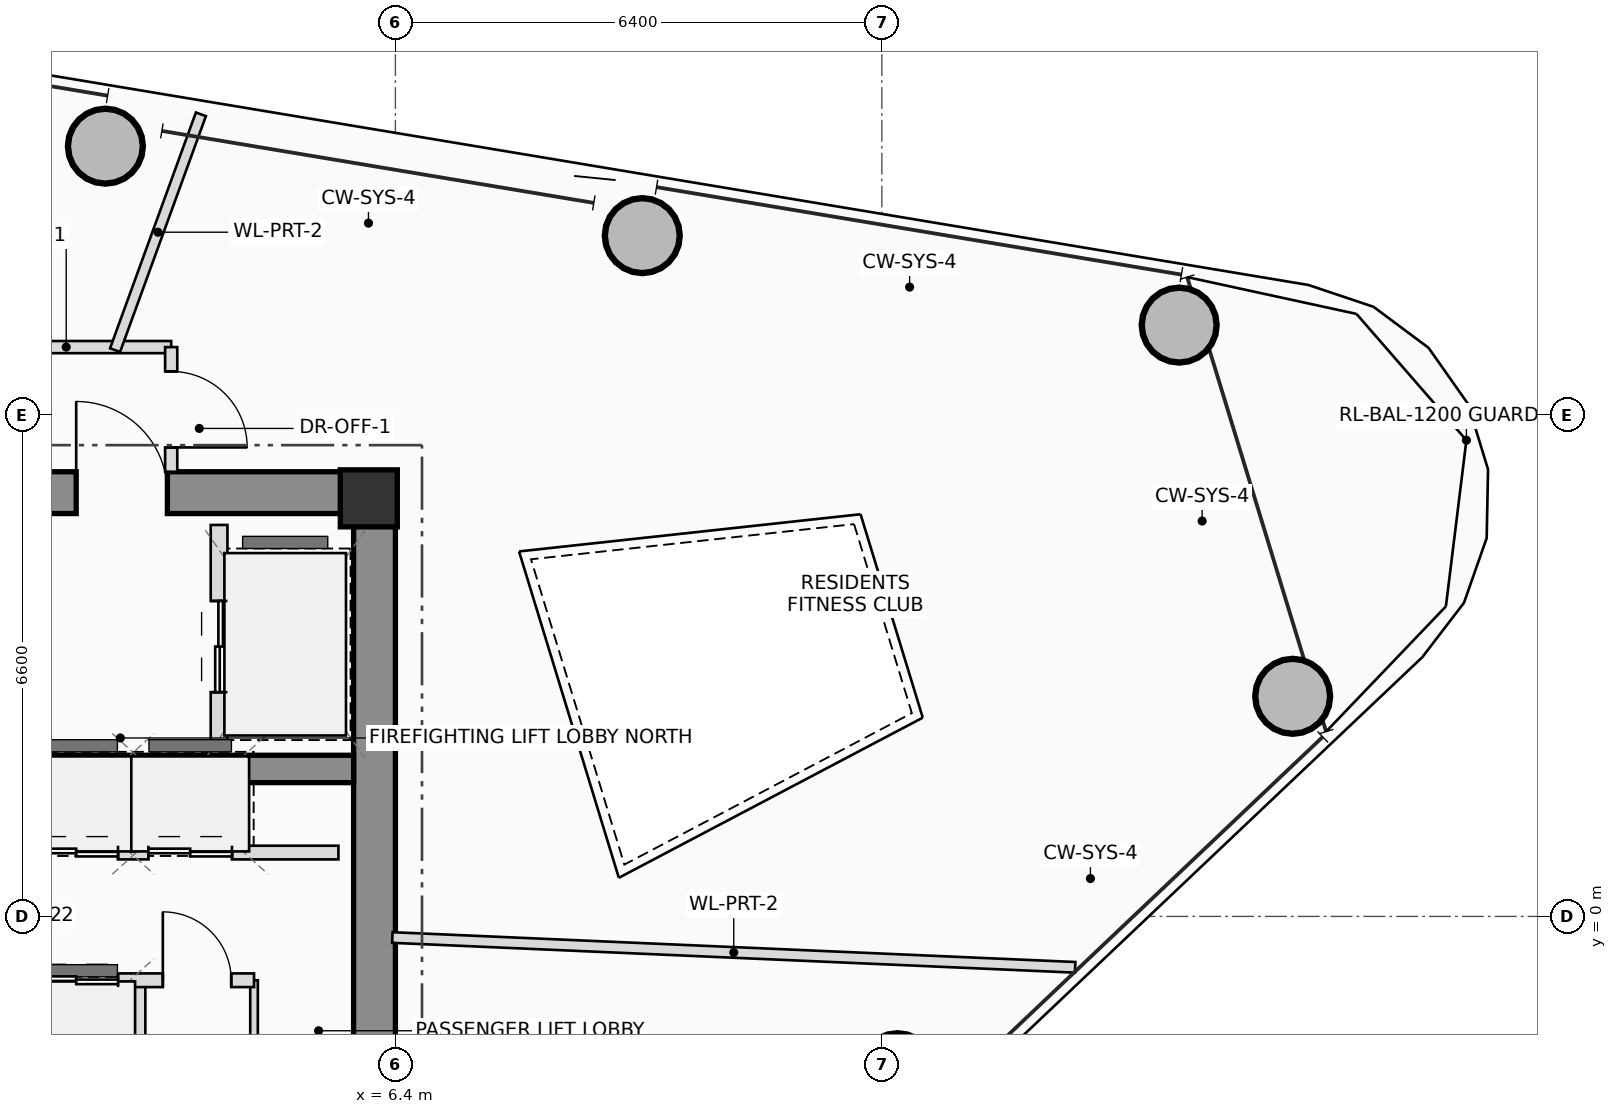
"""IFC4 building model, lengths in metres.
Left out: names, types, materials, properties, quantities, classifications, styles, units other than length and angle.
Written with IfcOpenShell. Run it as: python <this file> out.ifc"""

import sys

from ifc_helpers import new_model, si_unit, direction, frame, frame_2d, origin, origin_2d, place, context, subcontext, project, spatial, rectangle, hollow_circle, extrude, source, transform, mapped, element, fill, save


model = new_model("IFC4")
c1 = context("Model", 3, precision=1e-05, world=origin(), true_north=direction((0.0, 1.0)))
c2 = subcontext(c1, "Body", "Model", "MODEL_VIEW")
j1 = project(units=[si_unit("LENGTHUNIT", "METRE"), si_unit("PLANEANGLEUNIT", "RADIAN")], contexts=[c1])
p1 = place(None, origin())
s1 = spatial("IfcSite", under=j1, at=p1, CompositionType="ELEMENT")
p2 = place(p1, origin())
s2 = spatial("IfcBuilding", under=s1, at=p2, CompositionType="ELEMENT")
p3 = place(p2, frame((0.0, 0.0, 228.65)))
s3 = spatial("IfcBuildingStorey", under=s2, at=p3, CompositionType="ELEMENT", Elevation=228.65)
m1 = source(origin(), c2, "Body", "SweptSolid", [
    extrude(rectangle(XDim=0.75, YDim=0.75, at=origin_2d()), origin(), (0.0, 0.0, 1.0), 3.4),
])
p4 = place(p3, frame((6.05, 5.5, 0.0), z_axis=(0.0, 0.0, 1.0), x_axis=(1.0, 0.0, 0.0)))
e1 = element("IfcColumn", 1, at=p4, inside=s3, PredefinedType="COLUMN", context=c2, shape_type="MappedRepresentation", body=[
    mapped(m1, transform((0.0, 0.0, 0.0), scale=1.0)),
])
p5 = place(p3, frame((-6.4, 5.575, 0.0), z_axis=(0.0, 0.0, 1.0), x_axis=(1.0, 0.0, 0.0)))
e2 = element("IfcWall", 2, at=p5, inside=s3, PredefinedType="SHEAR", context=c2, shape_type="SweptSolid", body=[
    extrude(rectangle(XDim=12.8, YDim=0.55, at=frame_2d((6.4, 0.0))), origin(), (0.0, 0.0, 1.0), 3.4),
])
p6 = place(p5, frame((8.6, 0.0, 0.0)))
e3 = element("IfcOpeningElement", 3, at=p6, cuts=e2, PredefinedType="OPENING", context=c2, shape_type="SweptSolid", body=[
    extrude(rectangle(XDim=1.2, YDim=2.2, at=frame_2d((0.6, 1.1))), frame((0.0, 0.285, 0.0), z_axis=(0.0, -1.0, 0.0), x_axis=(1.0, 0.0, 0.0)), (0.0, 0.0, 1.0), 0.57),
])
p7 = place(p3, frame((6.125, -5.3, 0.0), z_axis=(0.0, 0.0, 1.0), x_axis=(0.0, 1.0, 0.0)))
e4 = element("IfcWall", 4, at=p7, inside=s3, PredefinedType="SHEAR", context=c2, shape_type="SweptSolid", body=[
    extrude(rectangle(XDim=10.6, YDim=0.55, at=frame_2d((5.3, 0.0))), origin(), (0.0, 0.0, 1.0), 3.4),
])
p8 = place(p3, frame((-5.85, 1.94, 0.0), z_axis=(0.0, 0.0, 1.0), x_axis=(1.0, 0.0, 0.0)))
e5 = element("IfcWall", 5, at=p8, inside=s3, PredefinedType="SHEAR", context=c2, shape_type="SweptSolid", body=[
    extrude(rectangle(XDim=11.7, YDim=0.36, at=frame_2d((5.85, 0.0))), origin(), (0.0, 0.0, 1.0), 3.4),
])
m2 = source(origin(), c2, "Body", "SweptSolid", [
    extrude(hollow_circle(Radius=0.5, WallThickness=0.04, at=origin_2d()), origin(), (0.0, 0.0, 1.0), 3.4),
])
for number, where, z_axis, x_axis in (
    (6, (13.007, -2.03, 0.0), (0.0, 0.0, 1.0), (1.0, 0.0, 0.0)),
    (7, (18.205, 2.896, 0.0), (0.0, 0.0, 1.0), (1.0, 0.0, 0.0)),
    (8, (16.712, 7.779, 0.0), (0.0, 0.0, 1.0), (1.0, 0.0, 0.0)),
    (9, (9.648, 8.957, 0.0), (0.0, 0.0, 1.0), (1.0, 0.0, 0.0)),
    (10, (2.584, 10.134, 0.0), (0.0, 0.0, 1.0), (1.0, 0.0, 0.0)),
):
    element("IfcColumn", number, at=place(p3, frame(where, z_axis=z_axis, x_axis=x_axis)), inside=s3, PredefinedType="COLUMN", context=c2, shape_type="MappedRepresentation", body=[
        mapped(m2, transform((0.0, 0.0, 0.0), scale=1.0)),
    ])
p9 = place(p3, frame((4.08, 2.2, 0.0), z_axis=(0.0, 0.0, 1.0), x_axis=(0.0, 1.0, 0.0)))
e11 = element("IfcWall", 11, at=p9, inside=s3, PredefinedType="PLUMBINGWALL", context=c2, shape_type="SweptSolid", body=[
    extrude(rectangle(XDim=2.95, YDim=0.22, at=frame_2d((1.475, 0.0))), origin(), (0.0, 0.0, 1.0), 3.2),
])
p10 = place(p9, frame((0.75, 0.0, 0.0)))
e12 = element("IfcOpeningElement", 12, at=p10, cuts=e11, PredefinedType="OPENING", context=c2, shape_type="SweptSolid", body=[
    extrude(rectangle(XDim=1.2, YDim=2.25, at=frame_2d((0.6, 1.125))), frame((0.0, 0.12, 0.0), z_axis=(0.0, -1.0, 0.0), x_axis=(1.0, 0.0, 0.0)), (0.0, 0.0, 1.0), 0.24),
])
for number, where, z_axis, x_axis in (
    (13, (3.02, 0.84, 0.0), (0.0, 0.0, 1.0), (0.0, 1.0, 0.0)),
    (14, (4.38, 0.84, 0.0), (0.0, 0.0, 1.0), (0.0, 1.0, 0.0)),
    (15, (3.02, -1.82, 0.0), (0.0, 0.0, 1.0), (0.0, 1.0, 0.0)),
):
    element("IfcWall", number, at=place(p3, frame(where, z_axis=z_axis, x_axis=x_axis)), inside=s3, PredefinedType="PLUMBINGWALL", context=c2, shape_type="SweptSolid", body=[
        extrude(rectangle(XDim=0.98, YDim=0.18, at=frame_2d((0.49, 0.0))), origin(), (0.0, 0.0, 1.0), 3.2),
    ])
p11 = place(p3, frame((4.54, -1.82, 0.0), z_axis=(0.0, 0.0, 1.0), x_axis=(0.0, 1.0, 0.0)))
e16 = element("IfcWall", 16, at=p11, inside=s3, PredefinedType="PARTITIONING", context=c2, shape_type="SweptSolid", body=[
    extrude(rectangle(XDim=0.98, YDim=0.1, at=frame_2d((0.49, 0.0))), origin(), (0.0, 0.0, 1.0), 3.2),
])
p12 = place(p3, frame((-5.68, 0.84, 0.0), z_axis=(0.0, 0.0, 1.0), x_axis=(1.0, 0.0, 0.0)))
e17 = element("IfcWall", 17, at=p12, inside=s3, PredefinedType="PLUMBINGWALL", context=c2, shape_type="SweptSolid", body=[
    extrude(rectangle(XDim=11.33, YDim=0.18, at=frame_2d((5.665, 0.0))), origin(), (0.0, 0.0, 1.0), 3.2),
])
p13 = place(p12, frame((3.13, 0.0, 0.0)))
e18 = element("IfcOpeningElement", 18, at=p13, cuts=e17, PredefinedType="OPENING", context=c2, shape_type="SweptSolid", body=[
    extrude(rectangle(XDim=0.9, YDim=2.05, at=frame_2d((0.45, 1.025))), frame((0.0, 0.1, 0.0), z_axis=(0.0, -1.0, 0.0), x_axis=(1.0, 0.0, 0.0)), (0.0, 0.0, 1.0), 0.2),
])
p14 = place(p12, frame((7.33, 0.0, 0.0)))
e19 = element("IfcOpeningElement", 19, at=p14, cuts=e17, PredefinedType="OPENING", context=c2, shape_type="SweptSolid", body=[
    extrude(rectangle(XDim=1.1, YDim=2.2, at=frame_2d((0.55, 1.1))), frame((0.0, 0.1, 0.0), z_axis=(0.0, -1.0, 0.0), x_axis=(1.0, 0.0, 0.0)), (0.0, 0.0, 1.0), 0.2),
])
p15 = place(p12, frame((8.83, 0.0, 0.0)))
e20 = element("IfcOpeningElement", 20, at=p15, cuts=e17, PredefinedType="OPENING", context=c2, shape_type="SweptSolid", body=[
    extrude(rectangle(XDim=1.1, YDim=2.2, at=frame_2d((0.55, 1.1))), frame((0.0, 0.1, 0.0), z_axis=(0.0, -1.0, 0.0), x_axis=(1.0, 0.0, 0.0)), (0.0, 0.0, 1.0), 0.2),
])
p16 = place(p3, frame((-5.68, -0.84, 0.0), z_axis=(0.0, 0.0, 1.0), x_axis=(1.0, 0.0, 0.0)))
e21 = element("IfcWall", 21, at=p16, inside=s3, PredefinedType="PLUMBINGWALL", context=c2, shape_type="SweptSolid", body=[
    extrude(rectangle(XDim=10.22, YDim=0.18, at=frame_2d((5.11, 0.0))), origin(), (0.0, 0.0, 1.0), 3.2),
])
p17 = place(p16, frame((1.88, 0.0, 0.0)))
e22 = element("IfcOpeningElement", 22, at=p17, cuts=e21, PredefinedType="OPENING", context=c2, shape_type="SweptSolid", body=[
    extrude(rectangle(XDim=0.9, YDim=2.05, at=frame_2d((0.45, 1.025))), frame((0.0, 0.1, 0.0), z_axis=(0.0, -1.0, 0.0), x_axis=(1.0, 0.0, 0.0)), (0.0, 0.0, 1.0), 0.2),
])
p18 = place(p16, frame((5.35, 0.0, 0.0)))
e23 = element("IfcOpeningElement", 23, at=p18, cuts=e21, PredefinedType="OPENING", context=c2, shape_type="SweptSolid", body=[
    extrude(rectangle(XDim=0.9, YDim=2.05, at=frame_2d((0.45, 1.025))), frame((0.0, 0.1, 0.0), z_axis=(0.0, -1.0, 0.0), x_axis=(1.0, 0.0, 0.0)), (0.0, 0.0, 1.0), 0.2),
])
p19 = place(p16, frame((7.33, 0.0, 0.0)))
e24 = element("IfcOpeningElement", 24, at=p19, cuts=e21, PredefinedType="OPENING", context=c2, shape_type="SweptSolid", body=[
    extrude(rectangle(XDim=1.1, YDim=2.2, at=frame_2d((0.55, 1.1))), frame((0.0, 0.1, 0.0), z_axis=(0.0, -1.0, 0.0), x_axis=(1.0, 0.0, 0.0)), (0.0, 0.0, 1.0), 0.2),
])
p20 = place(p16, frame((9.02, 0.0, 0.0)))
e25 = element("IfcOpeningElement", 25, at=p20, cuts=e21, PredefinedType="OPENING", context=c2, shape_type="SweptSolid", body=[
    extrude(rectangle(XDim=0.9, YDim=2.05, at=frame_2d((0.45, 1.025))), frame((0.0, 0.1, 0.0), z_axis=(0.0, -1.0, 0.0), x_axis=(1.0, 0.0, 0.0)), (0.0, 0.0, 1.0), 0.2),
])
p21 = place(p3, frame((-6.36, 7.49, 0.0), z_axis=(0.0, 0.0, 1.0), x_axis=(1.0, 0.0, 0.0)))
e26 = element("IfcWall", 26, at=p21, inside=s3, PredefinedType="PARTITIONING", context=c2, shape_type="SweptSolid", body=[
    extrude(rectangle(XDim=9.81, YDim=0.16, at=frame_2d((4.905, 0.0))), origin(), (0.0, 0.0, 1.0), 2.605),
])
p22 = place(p21, frame((1.867, 0.0, 0.0)))
e27 = element("IfcOpeningElement", 27, at=p22, cuts=e26, PredefinedType="OPENING", context=c2, shape_type="SweptSolid", body=[
    extrude(rectangle(XDim=1.0, YDim=2.25, at=frame_2d((0.5, 1.125))), frame((0.0, 0.09, 0.0), z_axis=(0.0, -1.0, 0.0), x_axis=(1.0, 0.0, 0.0)), (0.0, 0.0, 1.0), 0.18),
])
p23 = place(p21, frame((5.897, 0.0, 0.0)))
e28 = element("IfcOpeningElement", 28, at=p23, cuts=e26, PredefinedType="OPENING", context=c2, shape_type="SweptSolid", body=[
    extrude(rectangle(XDim=1.0, YDim=2.25, at=frame_2d((0.5, 1.125))), frame((0.0, 0.09, 0.0), z_axis=(0.0, -1.0, 0.0), x_axis=(1.0, 0.0, 0.0)), (0.0, 0.0, 1.0), 0.18),
])
p24 = place(p3, frame((3.45, 7.49, 0.0), z_axis=(0.0, 0.0, 1.0), x_axis=(0.0, -1.0, 0.0)))
e29 = element("IfcWall", 29, at=p24, inside=s3, PredefinedType="PARTITIONING", context=c2, shape_type="SweptSolid", body=[
    extrude(rectangle(XDim=1.64, YDim=0.16, at=frame_2d((0.82, 0.0))), origin(), (0.0, 0.0, 1.0), 3.2),
])
p25 = place(p24, frame((0.32, 0.0, 0.0)))
e30 = element("IfcOpeningElement", 30, at=p25, cuts=e29, PredefinedType="OPENING", context=c2, shape_type="SweptSolid", body=[
    extrude(rectangle(XDim=1.0, YDim=2.25, at=frame_2d((0.5, 1.125))), frame((0.0, 0.09, 0.0), z_axis=(0.0, -1.0, 0.0), x_axis=(1.0, 0.0, 0.0)), (0.0, 0.0, 1.0), 0.18),
])
p26 = place(p3, frame((6.36, -0.278, 0.0), z_axis=(0.0, 0.0, 1.0), x_axis=(0.99904773846, -0.043630451279, 0.0)))
e31 = element("IfcWall", 31, at=p26, inside=s3, PredefinedType="PARTITIONING", context=c2, shape_type="SweptSolid", body=[
    extrude(rectangle(XDim=8.992, YDim=0.14, at=frame_2d((4.496, 0.0))), origin(), (0.0, 0.0, 1.0), 2.605),
])
p27 = place(p3, frame((2.712, 7.45, 0.0), z_axis=(0.0, 0.0, 1.0), x_axis=(0.341974588874, 0.9397092, 0.0)))
e32 = element("IfcWall", 32, at=p27, inside=s3, PredefinedType="PARTITIONING", context=c2, shape_type="SweptSolid", body=[
    extrude(rectangle(XDim=3.302, YDim=0.14, at=frame_2d((1.651, 0.0))), origin(), (0.0, 0.0, 1.0), 2.605),
])
p28 = place(p6, origin())
e33 = element("IfcDoor", 33, at=p28, inside=s3, OperationType="SINGLE_SWING_LEFT", PredefinedType="DOOR", context=c2, shape_type="SweptSolid", body=[
    extrude(rectangle(XDim=1.2, YDim=2.2, at=frame_2d((0.6, 1.1))), frame((0.0, 0.025, 0.0), z_axis=(0.0, -1.0, 0.0), x_axis=(1.0, 0.0, 0.0)), (0.0, 0.0, 1.0), 0.05),
])
fill(e3, e33)
p29 = place(p10, origin())
e34 = element("IfcDoor", 34, at=p29, inside=s3, OperationType="DOUBLE_DOOR_SLIDING", PredefinedType="DOOR", context=c2, shape_type="SweptSolid", body=[
    extrude(rectangle(XDim=1.2, YDim=2.25, at=frame_2d((0.6, 1.125))), frame((0.0, 0.025, 0.0), z_axis=(0.0, -1.0, 0.0), x_axis=(1.0, 0.0, 0.0)), (0.0, 0.0, 1.0), 0.05),
])
fill(e12, e34)
p30 = place(p14, origin())
e35 = element("IfcDoor", 35, at=p30, inside=s3, OperationType="DOUBLE_DOOR_SLIDING", PredefinedType="DOOR", context=c2, shape_type="SweptSolid", body=[
    extrude(rectangle(XDim=1.1, YDim=2.2, at=frame_2d((0.55, 1.1))), frame((0.0, 0.025, 0.0), z_axis=(0.0, -1.0, 0.0), x_axis=(1.0, 0.0, 0.0)), (0.0, 0.0, 1.0), 0.05),
])
fill(e19, e35)
p31 = place(p15, origin())
e36 = element("IfcDoor", 36, at=p31, inside=s3, OperationType="DOUBLE_DOOR_SLIDING", PredefinedType="DOOR", context=c2, shape_type="SweptSolid", body=[
    extrude(rectangle(XDim=1.1, YDim=2.2, at=frame_2d((0.55, 1.1))), frame((0.0, 0.025, 0.0), z_axis=(0.0, -1.0, 0.0), x_axis=(1.0, 0.0, 0.0)), (0.0, 0.0, 1.0), 0.05),
])
fill(e20, e36)
p32 = place(p19, origin())
e37 = element("IfcDoor", 37, at=p32, inside=s3, OperationType="DOUBLE_DOOR_SLIDING", PredefinedType="DOOR", context=c2, shape_type="SweptSolid", body=[
    extrude(rectangle(XDim=1.1, YDim=2.2, at=frame_2d((0.55, 1.1))), frame((0.0, 0.025, 0.0), z_axis=(0.0, -1.0, 0.0), x_axis=(1.0, 0.0, 0.0)), (0.0, 0.0, 1.0), 0.05),
])
fill(e24, e37)
p33 = place(p20, origin())
e38 = element("IfcDoor", 38, at=p33, inside=s3, OperationType="SINGLE_SWING_LEFT", PredefinedType="DOOR", context=c2, shape_type="SweptSolid", body=[
    extrude(rectangle(XDim=0.9, YDim=2.05, at=frame_2d((0.45, 1.025))), frame((0.0, 0.025, 0.0), z_axis=(0.0, -1.0, 0.0), x_axis=(1.0, 0.0, 0.0)), (0.0, 0.0, 1.0), 0.05),
])
fill(e25, e38)
p34 = place(p25, origin())
e39 = element("IfcDoor", 39, at=p34, inside=s3, OperationType="SINGLE_SWING_RIGHT", PredefinedType="DOOR", context=c2, shape_type="SweptSolid", body=[
    extrude(rectangle(XDim=1.0, YDim=2.25, at=frame_2d((0.5, 1.125))), frame((0.0, 0.025, 0.0), z_axis=(0.0, -1.0, 0.0), x_axis=(1.0, 0.0, 0.0)), (0.0, 0.0, 1.0), 0.05),
])
fill(e30, e39)
save(model, sys.argv[1])
